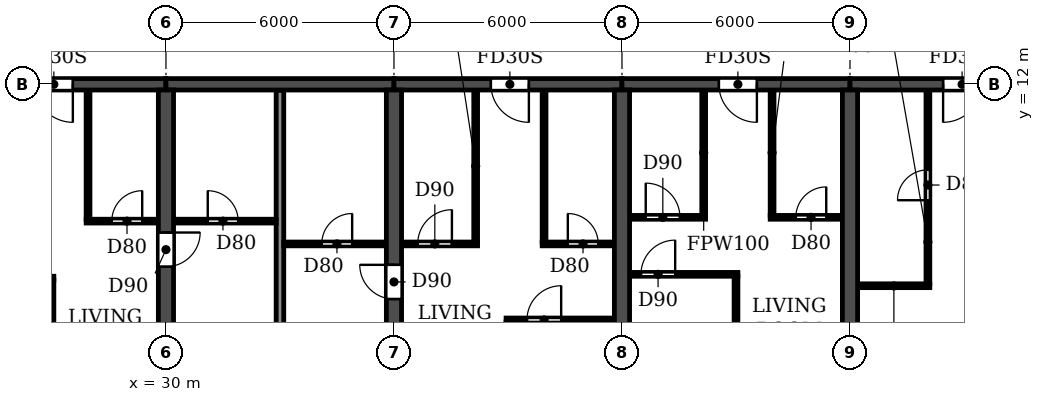
"""IFC4 building model, lengths in metres.
Left out: names, types, materials, properties, quantities, classifications, styles, units other than length and angle.
Written with IfcOpenShell. Run it as: python <this file> out.ifc"""

import sys

from ifc_helpers import new_model, si_unit, direction, frame, frame_2d, origin, place, context, subcontext, project, spatial, rectangle, extrude, element, fill, save


model = new_model("IFC4")
c1 = context("Model", 3, precision=1e-05, world=origin(), true_north=direction((0.0, 1.0)))
c2 = subcontext(c1, "Body", "Model", "MODEL_VIEW")
j1 = project(units=[si_unit("LENGTHUNIT", "METRE"), si_unit("PLANEANGLEUNIT", "RADIAN")], contexts=[c1])
p1 = place(None, origin())
s1 = spatial("IfcSite", under=j1, at=p1, CompositionType="ELEMENT")
p2 = place(p1, origin())
s2 = spatial("IfcBuilding", under=s1, at=p2, CompositionType="ELEMENT")
p3 = place(p2, frame((0.0, 0.0, 63.0)))
s3 = spatial("IfcBuildingStorey", under=s2, at=p3, CompositionType="ELEMENT", Elevation=63.0)
p4 = place(p3, frame((30.0, 0.2, 0.0), z_axis=(0.0, 0.0, 1.0), x_axis=(0.0, 1.0, 0.0)))
e1 = element("IfcWall", 1, at=p4, inside=s3, PredefinedType="SHEAR", context=c2, shape_type="SweptSolid", body=[
    extrude(rectangle(XDim=11.65, YDim=0.4, at=frame_2d((5.825, 0.0))), origin(), (0.0, 0.0, 1.0), 2.95),
])
p5 = place(p4, frame((7.0, 0.0, 0.0)))
e2 = element("IfcOpeningElement", 2, at=p5, cuts=e1, PredefinedType="OPENING", context=c2, shape_type="SweptSolid", body=[
    extrude(rectangle(XDim=0.9, YDim=2.1, at=frame_2d((0.45, 1.05))), frame((0.0, 0.21, 0.0), z_axis=(0.0, -1.0, 0.0), x_axis=(1.0, 0.0, 0.0)), (0.0, 0.0, 1.0), 0.42),
])
p6 = place(p3, frame((36.0, 0.2, 0.0), z_axis=(0.0, 0.0, 1.0), x_axis=(0.0, 1.0, 0.0)))
e3 = element("IfcWall", 3, at=p6, inside=s3, PredefinedType="SHEAR", context=c2, shape_type="SweptSolid", body=[
    extrude(rectangle(XDim=11.65, YDim=0.4, at=frame_2d((5.825, 0.0))), origin(), (0.0, 0.0, 1.0), 2.95),
])
p7 = place(p6, frame((6.15, 0.0, 0.0)))
e4 = element("IfcOpeningElement", 4, at=p7, cuts=e3, PredefinedType="OPENING", context=c2, shape_type="SweptSolid", body=[
    extrude(rectangle(XDim=0.9, YDim=2.1, at=frame_2d((0.45, 1.05))), frame((0.0, 0.21, 0.0), z_axis=(0.0, -1.0, 0.0), x_axis=(1.0, 0.0, 0.0)), (0.0, 0.0, 1.0), 0.42),
])
for number, where, z_axis, x_axis in (
    (5, (42.0, 0.2, 0.0), (0.0, 0.0, 1.0), (0.0, 1.0, 0.0)),
    (6, (48.0, 0.2, 0.0), (0.0, 0.0, 1.0), (0.0, 1.0, 0.0)),
):
    element("IfcWall", number, at=place(p3, frame(where, z_axis=z_axis, x_axis=x_axis)), inside=s3, PredefinedType="SHEAR", context=c2, shape_type="SweptSolid", body=[
        extrude(rectangle(XDim=11.65, YDim=0.4, at=frame_2d((5.825, 0.0))), origin(), (0.0, 0.0, 1.0), 2.95),
    ])
p8 = place(p3, frame((24.0, 12.0, 0.0), z_axis=(0.0, 0.0, 1.0), x_axis=(1.0, 0.0, 0.0)))
e7 = element("IfcWall", 7, at=p8, inside=s3, PredefinedType="SHEAR", context=c2, shape_type="SweptSolid", body=[
    extrude(rectangle(XDim=6.0, YDim=0.3, at=frame_2d((3.0, 0.0))), origin(), (0.0, 0.0, 1.0), 2.35),
])
p9 = place(p8, frame((2.55, 0.0, 0.0)))
e8 = element("IfcOpeningElement", 8, at=p9, cuts=e7, PredefinedType="OPENING", context=c2, shape_type="SweptSolid", body=[
    extrude(rectangle(XDim=1.0, YDim=2.1, at=frame_2d((0.5, 1.05))), frame((0.0, 0.16, 0.0), z_axis=(0.0, -1.0, 0.0), x_axis=(1.0, 0.0, 0.0)), (0.0, 0.0, 1.0), 0.32),
])
p10 = place(p3, frame((30.0, 12.0, 0.0), z_axis=(0.0, 0.0, 1.0), x_axis=(1.0, 0.0, 0.0)))
e9 = element("IfcWall", 9, at=p10, inside=s3, PredefinedType="SHEAR", context=c2, shape_type="SweptSolid", body=[
    extrude(rectangle(XDim=6.0, YDim=0.3, at=frame_2d((3.0, 0.0))), origin(), (0.0, 0.0, 1.0), 2.35),
])
p11 = place(p3, frame((36.0, 12.0, 0.0), z_axis=(0.0, 0.0, 1.0), x_axis=(1.0, 0.0, 0.0)))
e10 = element("IfcWall", 10, at=p11, inside=s3, PredefinedType="SHEAR", context=c2, shape_type="SweptSolid", body=[
    extrude(rectangle(XDim=6.0, YDim=0.3, at=frame_2d((3.0, 0.0))), origin(), (0.0, 0.0, 1.0), 2.35),
])
p12 = place(p11, frame((2.55, 0.0, 0.0)))
e11 = element("IfcOpeningElement", 11, at=p12, cuts=e10, PredefinedType="OPENING", context=c2, shape_type="SweptSolid", body=[
    extrude(rectangle(XDim=1.0, YDim=2.1, at=frame_2d((0.5, 1.05))), frame((0.0, 0.16, 0.0), z_axis=(0.0, -1.0, 0.0), x_axis=(1.0, 0.0, 0.0)), (0.0, 0.0, 1.0), 0.32),
])
p13 = place(p3, frame((42.0, 12.0, 0.0), z_axis=(0.0, 0.0, 1.0), x_axis=(1.0, 0.0, 0.0)))
e12 = element("IfcWall", 12, at=p13, inside=s3, PredefinedType="SHEAR", context=c2, shape_type="SweptSolid", body=[
    extrude(rectangle(XDim=6.0, YDim=0.3, at=frame_2d((3.0, 0.0))), origin(), (0.0, 0.0, 1.0), 2.35),
])
p14 = place(p13, frame((2.55, 0.0, 0.0)))
e13 = element("IfcOpeningElement", 13, at=p14, cuts=e12, PredefinedType="OPENING", context=c2, shape_type="SweptSolid", body=[
    extrude(rectangle(XDim=1.0, YDim=2.1, at=frame_2d((0.5, 1.05))), frame((0.0, 0.16, 0.0), z_axis=(0.0, -1.0, 0.0), x_axis=(1.0, 0.0, 0.0)), (0.0, 0.0, 1.0), 0.32),
])
p15 = place(p3, frame((48.0, 12.0, 0.0), z_axis=(0.0, 0.0, 1.0), x_axis=(1.0, 0.0, 0.0)))
e14 = element("IfcWall", 14, at=p15, inside=s3, PredefinedType="SHEAR", context=c2, shape_type="SweptSolid", body=[
    extrude(rectangle(XDim=6.0, YDim=0.3, at=frame_2d((3.0, 0.0))), origin(), (0.0, 0.0, 1.0), 2.35),
])
p16 = place(p15, frame((2.45, 0.0, 0.0)))
e15 = element("IfcOpeningElement", 15, at=p16, cuts=e14, PredefinedType="OPENING", context=c2, shape_type="SweptSolid", body=[
    extrude(rectangle(XDim=1.0, YDim=2.1, at=frame_2d((0.5, 1.05))), frame((0.0, 0.16, 0.0), z_axis=(0.0, -1.0, 0.0), x_axis=(1.0, 0.0, 0.0)), (0.0, 0.0, 1.0), 0.32),
])
p17 = place(p3, frame((33.0, 0.06, 0.0), z_axis=(0.0, 0.0, 1.0), x_axis=(0.0, 1.0, 0.0)))
e16 = element("IfcWall", 16, at=p17, inside=s3, PredefinedType="PARTITIONING", context=c2, shape_type="SweptSolid", body=[
    extrude(rectangle(XDim=11.78, YDim=0.2, at=frame_2d((5.89, 0.0))), origin(), (0.0, 0.0, 1.0), 2.95),
])
p18 = place(p3, frame((38.95, 5.8, 0.0), z_axis=(0.0, 0.0, 1.0), x_axis=(1.0, 0.0, 0.0)))
e17 = element("IfcWall", 17, at=p18, inside=s3, PredefinedType="PARTITIONING", context=c2, shape_type="SweptSolid", body=[
    extrude(rectangle(XDim=2.84, YDim=0.1, at=frame_2d((1.42, 0.0))), origin(), (0.0, 0.0, 1.0), 2.95),
])
p19 = place(p18, frame((0.55, 0.0, 0.0)))
e18 = element("IfcOpeningElement", 18, at=p19, cuts=e17, PredefinedType="OPENING", context=c2, shape_type="SweptSolid", body=[
    extrude(rectangle(XDim=0.9, YDim=2.1, at=frame_2d((0.45, 1.05))), frame((0.0, 0.06, 0.0), z_axis=(0.0, -1.0, 0.0), x_axis=(1.0, 0.0, 0.0)), (0.0, 0.0, 1.0), 0.12),
])
p20 = place(p3, frame((48.21, 6.7, 0.0), z_axis=(0.0, 0.0, 1.0), x_axis=(1.0, 0.0, 0.0)))
e19 = element("IfcWall", 19, at=p20, inside=s3, PredefinedType="PARTITIONING", context=c2, shape_type="SweptSolid", body=[
    extrude(rectangle(XDim=1.89, YDim=0.1, at=frame_2d((0.945, 0.0))), origin(), (0.0, 0.0, 1.0), 2.95),
])
p21 = place(p3, frame((24.21, 6.9, 0.0), z_axis=(0.0, 0.0, 1.0), x_axis=(1.0, 0.0, 0.0)))
e20 = element("IfcWall", 20, at=p21, inside=s3, PredefinedType="PARTITIONING", context=c2, shape_type="SweptSolid", body=[
    extrude(rectangle(XDim=2.84, YDim=0.1, at=frame_2d((1.42, 0.0))), origin(), (0.0, 0.0, 1.0), 2.95),
])
p22 = place(p21, frame((0.29, 0.0, 0.0)))
e21 = element("IfcOpeningElement", 21, at=p22, cuts=e20, PredefinedType="OPENING", context=c2, shape_type="SweptSolid", body=[
    extrude(rectangle(XDim=0.9, YDim=2.1, at=frame_2d((0.45, 1.05))), frame((0.0, 0.06, 0.0), z_axis=(0.0, -1.0, 0.0), x_axis=(1.0, 0.0, 0.0)), (0.0, 0.0, 1.0), 0.12),
])
p23 = place(p3, frame((42.21, 7.0, 0.0), z_axis=(0.0, 0.0, 1.0), x_axis=(1.0, 0.0, 0.0)))
e22 = element("IfcWall", 22, at=p23, inside=s3, PredefinedType="PARTITIONING", context=c2, shape_type="SweptSolid", body=[
    extrude(rectangle(XDim=2.84, YDim=0.1, at=frame_2d((1.42, 0.0))), origin(), (0.0, 0.0, 1.0), 2.95),
])
p24 = place(p23, frame((0.29, 0.0, 0.0)))
e23 = element("IfcOpeningElement", 23, at=p24, cuts=e22, PredefinedType="OPENING", context=c2, shape_type="SweptSolid", body=[
    extrude(rectangle(XDim=0.9, YDim=2.1, at=frame_2d((0.45, 1.05))), frame((0.0, 0.06, 0.0), z_axis=(0.0, -1.0, 0.0), x_axis=(1.0, 0.0, 0.0)), (0.0, 0.0, 1.0), 0.12),
])
p25 = place(p3, frame((33.1, 7.8, 0.0), z_axis=(0.0, 0.0, 1.0), x_axis=(1.0, 0.0, 0.0)))
e24 = element("IfcWall", 24, at=p25, inside=s3, PredefinedType="PARTITIONING", context=c2, shape_type="SweptSolid", body=[
    extrude(rectangle(XDim=2.69, YDim=0.1, at=frame_2d((1.345, 0.0))), origin(), (0.0, 0.0, 1.0), 2.95),
])
p26 = place(p25, frame((1.0, 0.0, 0.0)))
e25 = element("IfcOpeningElement", 25, at=p26, cuts=e24, PredefinedType="OPENING", context=c2, shape_type="SweptSolid", body=[
    extrude(rectangle(XDim=0.8, YDim=2.1, at=frame_2d((0.4, 1.05))), frame((0.0, 0.06, 0.0), z_axis=(0.0, -1.0, 0.0), x_axis=(1.0, 0.0, 0.0)), (0.0, 0.0, 1.0), 0.12),
])
p27 = place(p3, frame((36.21, 7.8, 0.0), z_axis=(0.0, 0.0, 1.0), x_axis=(1.0, 0.0, 0.0)))
e26 = element("IfcWall", 26, at=p27, inside=s3, PredefinedType="PARTITIONING", context=c2, shape_type="SweptSolid", body=[
    extrude(rectangle(XDim=1.99, YDim=0.1, at=frame_2d((0.995, 0.0))), origin(), (0.0, 0.0, 1.0), 2.95),
])
p28 = place(p27, frame((0.415, 0.0, 0.0)))
e27 = element("IfcOpeningElement", 27, at=p28, cuts=e26, PredefinedType="OPENING", context=c2, shape_type="SweptSolid", body=[
    extrude(rectangle(XDim=0.9, YDim=2.1, at=frame_2d((0.45, 1.05))), frame((0.0, 0.06, 0.0), z_axis=(0.0, -1.0, 0.0), x_axis=(1.0, 0.0, 0.0)), (0.0, 0.0, 1.0), 0.12),
])
p29 = place(p3, frame((39.9, 7.8, 0.0), z_axis=(0.0, 0.0, 1.0), x_axis=(1.0, 0.0, 0.0)))
e28 = element("IfcWall", 28, at=p29, inside=s3, PredefinedType="PARTITIONING", context=c2, shape_type="SweptSolid", body=[
    extrude(rectangle(XDim=1.89, YDim=0.1, at=frame_2d((0.945, 0.0))), origin(), (0.0, 0.0, 1.0), 2.95),
])
p30 = place(p29, frame((0.675, 0.0, 0.0)))
e29 = element("IfcOpeningElement", 29, at=p30, cuts=e28, PredefinedType="OPENING", context=c2, shape_type="SweptSolid", body=[
    extrude(rectangle(XDim=0.8, YDim=2.1, at=frame_2d((0.4, 1.05))), frame((0.0, 0.06, 0.0), z_axis=(0.0, -1.0, 0.0), x_axis=(1.0, 0.0, 0.0)), (0.0, 0.0, 1.0), 0.12),
])
p31 = place(p3, frame((27.9, 8.4, 0.0), z_axis=(0.0, 0.0, 1.0), x_axis=(1.0, 0.0, 0.0)))
e30 = element("IfcWall", 30, at=p31, inside=s3, PredefinedType="PARTITIONING", context=c2, shape_type="SweptSolid", body=[
    extrude(rectangle(XDim=1.89, YDim=0.1, at=frame_2d((0.945, 0.0))), origin(), (0.0, 0.0, 1.0), 2.95),
])
p32 = place(p31, frame((0.675, 0.0, 0.0)))
e31 = element("IfcOpeningElement", 31, at=p32, cuts=e30, PredefinedType="OPENING", context=c2, shape_type="SweptSolid", body=[
    extrude(rectangle(XDim=0.8, YDim=2.1, at=frame_2d((0.4, 1.05))), frame((0.0, 0.06, 0.0), z_axis=(0.0, -1.0, 0.0), x_axis=(1.0, 0.0, 0.0)), (0.0, 0.0, 1.0), 0.12),
])
p33 = place(p3, frame((30.21, 8.4, 0.0), z_axis=(0.0, 0.0, 1.0), x_axis=(1.0, 0.0, 0.0)))
e32 = element("IfcWall", 32, at=p33, inside=s3, PredefinedType="PARTITIONING", context=c2, shape_type="SweptSolid", body=[
    extrude(rectangle(XDim=2.69, YDim=0.1, at=frame_2d((1.345, 0.0))), origin(), (0.0, 0.0, 1.0), 2.95),
])
p34 = place(p33, frame((0.89, 0.0, 0.0)))
e33 = element("IfcOpeningElement", 33, at=p34, cuts=e32, PredefinedType="OPENING", context=c2, shape_type="SweptSolid", body=[
    extrude(rectangle(XDim=0.8, YDim=2.1, at=frame_2d((0.4, 1.05))), frame((0.0, 0.06, 0.0), z_axis=(0.0, -1.0, 0.0), x_axis=(1.0, 0.0, 0.0)), (0.0, 0.0, 1.0), 0.12),
])
p35 = place(p3, frame((42.21, 8.5, 0.0), z_axis=(0.0, 0.0, 1.0), x_axis=(1.0, 0.0, 0.0)))
e34 = element("IfcWall", 34, at=p35, inside=s3, PredefinedType="PARTITIONING", context=c2, shape_type="SweptSolid", body=[
    extrude(rectangle(XDim=1.99, YDim=0.1, at=frame_2d((0.995, 0.0))), origin(), (0.0, 0.0, 1.0), 2.95),
])
p36 = place(p35, frame((0.415, 0.0, 0.0)))
e35 = element("IfcOpeningElement", 35, at=p36, cuts=e34, PredefinedType="OPENING", context=c2, shape_type="SweptSolid", body=[
    extrude(rectangle(XDim=0.9, YDim=2.1, at=frame_2d((0.45, 1.05))), frame((0.0, 0.06, 0.0), z_axis=(0.0, -1.0, 0.0), x_axis=(1.0, 0.0, 0.0)), (0.0, 0.0, 1.0), 0.12),
])
p37 = place(p3, frame((45.9, 8.5, 0.0), z_axis=(0.0, 0.0, 1.0), x_axis=(1.0, 0.0, 0.0)))
e36 = element("IfcWall", 36, at=p37, inside=s3, PredefinedType="PARTITIONING", context=c2, shape_type="SweptSolid", body=[
    extrude(rectangle(XDim=1.89, YDim=0.1, at=frame_2d((0.945, 0.0))), origin(), (0.0, 0.0, 1.0), 2.95),
])
p38 = place(p37, frame((0.675, 0.0, 0.0)))
e37 = element("IfcOpeningElement", 37, at=p38, cuts=e36, PredefinedType="OPENING", context=c2, shape_type="SweptSolid", body=[
    extrude(rectangle(XDim=0.8, YDim=2.1, at=frame_2d((0.4, 1.05))), frame((0.0, 0.06, 0.0), z_axis=(0.0, -1.0, 0.0), x_axis=(1.0, 0.0, 0.0)), (0.0, 0.0, 1.0), 0.12),
])
p39 = place(p3, frame((27.0, 0.06, 0.0), z_axis=(0.0, 0.0, 1.0), x_axis=(0.0, 1.0, 0.0)))
e38 = element("IfcWall", 38, at=p39, inside=s3, PredefinedType="PARTITIONING", context=c2, shape_type="SweptSolid", body=[
    extrude(rectangle(XDim=6.79, YDim=0.1, at=frame_2d((3.395, 0.0))), origin(), (0.0, 0.0, 1.0), 2.95),
])
p40 = place(p3, frame((27.95, 8.45, 0.0), z_axis=(0.0, 0.0, 1.0), x_axis=(0.0, 1.0, 0.0)))
e39 = element("IfcWall", 39, at=p40, inside=s3, PredefinedType="PARTITIONING", context=c2, shape_type="SweptSolid", body=[
    extrude(rectangle(XDim=3.39, YDim=0.1, at=frame_2d((1.695, 0.0))), origin(), (0.0, 0.0, 1.0), 2.95),
])
for number, where, z_axis, x_axis in (
    (40, (38.15, 7.85, 0.0), (0.0, 0.0, 1.0), (0.0, 1.0, 0.0)),
    (41, (39.95, 7.85, 0.0), (0.0, 0.0, 1.0), (0.0, 1.0, 0.0)),
):
    element("IfcWall", number, at=place(p3, frame(where, z_axis=z_axis, x_axis=x_axis)), inside=s3, PredefinedType="PARTITIONING", context=c2, shape_type="SweptSolid", body=[
        extrude(rectangle(XDim=3.99, YDim=0.1, at=frame_2d((1.995, 0.0))), origin(), (0.0, 0.0, 1.0), 2.95),
    ])
p41 = place(p3, frame((44.15, 8.55, 0.0), z_axis=(0.0, 0.0, 1.0), x_axis=(0.0, 1.0, 0.0)))
e42 = element("IfcWall", 42, at=p41, inside=s3, PredefinedType="PARTITIONING", context=c2, shape_type="SweptSolid", body=[
    extrude(rectangle(XDim=3.29, YDim=0.1, at=frame_2d((1.645, 0.0))), origin(), (0.0, 0.0, 1.0), 2.95),
])
p42 = place(p3, frame((45.0, 0.06, 0.0), z_axis=(0.0, 0.0, 1.0), x_axis=(0.0, 1.0, 0.0)))
e43 = element("IfcWall", 43, at=p42, inside=s3, PredefinedType="PARTITIONING", context=c2, shape_type="SweptSolid", body=[
    extrude(rectangle(XDim=6.89, YDim=0.1, at=frame_2d((3.445, 0.0))), origin(), (0.0, 0.0, 1.0), 2.95),
])
p43 = place(p3, frame((45.95, 8.55, 0.0), z_axis=(0.0, 0.0, 1.0), x_axis=(0.0, 1.0, 0.0)))
e44 = element("IfcWall", 44, at=p43, inside=s3, PredefinedType="PARTITIONING", context=c2, shape_type="SweptSolid", body=[
    extrude(rectangle(XDim=3.29, YDim=0.1, at=frame_2d((1.645, 0.0))), origin(), (0.0, 0.0, 1.0), 2.95),
])
p44 = place(p3, frame((50.05, 6.75, 0.0), z_axis=(0.0, 0.0, 1.0), x_axis=(0.0, 1.0, 0.0)))
e45 = element("IfcWall", 45, at=p44, inside=s3, PredefinedType="PARTITIONING", context=c2, shape_type="SweptSolid", body=[
    extrude(rectangle(XDim=5.09, YDim=0.1, at=frame_2d((2.545, 0.0))), origin(), (0.0, 0.0, 1.0), 2.95),
])
p45 = place(p44, frame((2.2, 0.0, 0.0)))
e46 = element("IfcOpeningElement", 46, at=p45, cuts=e45, PredefinedType="OPENING", context=c2, shape_type="SweptSolid", body=[
    extrude(rectangle(XDim=0.8, YDim=2.1, at=frame_2d((0.4, 1.05))), frame((0.0, 0.06, 0.0), z_axis=(0.0, -1.0, 0.0), x_axis=(1.0, 0.0, 0.0)), (0.0, 0.0, 1.0), 0.12),
])
p46 = place(p34, origin())
e47 = element("IfcDoor", 47, at=p46, inside=s3, OperationType="SINGLE_SWING_LEFT", PredefinedType="DOOR", context=c2, shape_type="SweptSolid", body=[
    extrude(rectangle(XDim=0.8, YDim=2.1, at=frame_2d((0.4, 1.05))), frame((0.0, 0.025, 0.0), z_axis=(0.0, -1.0, 0.0), x_axis=(1.0, 0.0, 0.0)), (0.0, 0.0, 1.0), 0.05),
])
fill(e33, e47)
p47 = place(p9, frame((1.0, 0.0, 0.0), z_axis=(0.0, 0.0, 1.0), x_axis=(-1.0, 0.0, 0.0)))
e48 = element("IfcDoor", 48, at=p47, inside=s3, OperationType="SINGLE_SWING_LEFT", PredefinedType="DOOR", context=c2, shape_type="SweptSolid", body=[
    extrude(rectangle(XDim=1.0, YDim=2.1, at=frame_2d((0.5, 1.05))), frame((0.0, 0.025, 0.0), z_axis=(0.0, -1.0, 0.0), x_axis=(1.0, 0.0, 0.0)), (0.0, 0.0, 1.0), 0.05),
])
fill(e8, e48)
p48 = place(p32, origin())
e49 = element("IfcDoor", 49, at=p48, inside=s3, OperationType="SINGLE_SWING_RIGHT", PredefinedType="DOOR", context=c2, shape_type="SweptSolid", body=[
    extrude(rectangle(XDim=0.8, YDim=2.1, at=frame_2d((0.4, 1.05))), frame((0.0, 0.025, 0.0), z_axis=(0.0, -1.0, 0.0), x_axis=(1.0, 0.0, 0.0)), (0.0, 0.0, 1.0), 0.05),
])
fill(e31, e49)
p49 = place(p5, frame((0.9, 0.0, 0.0), z_axis=(0.0, 0.0, 1.0), x_axis=(-1.0, 0.0, 0.0)))
e50 = element("IfcDoor", 50, at=p49, inside=s3, OperationType="SINGLE_SWING_LEFT", PredefinedType="DOOR", context=c2, shape_type="SweptSolid", body=[
    extrude(rectangle(XDim=0.9, YDim=2.1, at=frame_2d((0.45, 1.05))), frame((0.0, 0.025, 0.0), z_axis=(0.0, -1.0, 0.0), x_axis=(1.0, 0.0, 0.0)), (0.0, 0.0, 1.0), 0.05),
])
fill(e2, e50)
p50 = place(p26, origin())
e51 = element("IfcDoor", 51, at=p50, inside=s3, OperationType="SINGLE_SWING_RIGHT", PredefinedType="DOOR", context=c2, shape_type="SweptSolid", body=[
    extrude(rectangle(XDim=0.8, YDim=2.1, at=frame_2d((0.4, 1.05))), frame((0.0, 0.025, 0.0), z_axis=(0.0, -1.0, 0.0), x_axis=(1.0, 0.0, 0.0)), (0.0, 0.0, 1.0), 0.05),
])
fill(e25, e51)
p51 = place(p7, origin())
e52 = element("IfcDoor", 52, at=p51, inside=s3, OperationType="SINGLE_SWING_RIGHT", PredefinedType="DOOR", context=c2, shape_type="SweptSolid", body=[
    extrude(rectangle(XDim=0.9, YDim=2.1, at=frame_2d((0.45, 1.05))), frame((0.0, 0.025, 0.0), z_axis=(0.0, -1.0, 0.0), x_axis=(1.0, 0.0, 0.0)), (0.0, 0.0, 1.0), 0.05),
])
fill(e4, e52)
p52 = place(p28, origin())
e53 = element("IfcDoor", 53, at=p52, inside=s3, OperationType="SINGLE_SWING_RIGHT", PredefinedType="DOOR", context=c2, shape_type="SweptSolid", body=[
    extrude(rectangle(XDim=0.9, YDim=2.1, at=frame_2d((0.45, 1.05))), frame((0.0, 0.025, 0.0), z_axis=(0.0, -1.0, 0.0), x_axis=(1.0, 0.0, 0.0)), (0.0, 0.0, 1.0), 0.05),
])
fill(e27, e53)
p53 = place(p12, frame((1.0, 0.0, 0.0), z_axis=(0.0, 0.0, 1.0), x_axis=(-1.0, 0.0, 0.0)))
e54 = element("IfcDoor", 54, at=p53, inside=s3, OperationType="SINGLE_SWING_LEFT", PredefinedType="DOOR", context=c2, shape_type="SweptSolid", body=[
    extrude(rectangle(XDim=1.0, YDim=2.1, at=frame_2d((0.5, 1.05))), frame((0.0, 0.025, 0.0), z_axis=(0.0, -1.0, 0.0), x_axis=(1.0, 0.0, 0.0)), (0.0, 0.0, 1.0), 0.05),
])
fill(e11, e54)
p54 = place(p19, origin())
e55 = element("IfcDoor", 55, at=p54, inside=s3, OperationType="SINGLE_SWING_RIGHT", PredefinedType="DOOR", context=c2, shape_type="SweptSolid", body=[
    extrude(rectangle(XDim=0.9, YDim=2.1, at=frame_2d((0.45, 1.05))), frame((0.0, 0.025, 0.0), z_axis=(0.0, -1.0, 0.0), x_axis=(1.0, 0.0, 0.0)), (0.0, 0.0, 1.0), 0.05),
])
fill(e18, e55)
p55 = place(p30, origin())
e56 = element("IfcDoor", 56, at=p55, inside=s3, OperationType="SINGLE_SWING_LEFT", PredefinedType="DOOR", context=c2, shape_type="SweptSolid", body=[
    extrude(rectangle(XDim=0.8, YDim=2.1, at=frame_2d((0.4, 1.05))), frame((0.0, 0.025, 0.0), z_axis=(0.0, -1.0, 0.0), x_axis=(1.0, 0.0, 0.0)), (0.0, 0.0, 1.0), 0.05),
])
fill(e29, e56)
p56 = place(p24, origin())
e57 = element("IfcDoor", 57, at=p56, inside=s3, OperationType="SINGLE_SWING_RIGHT", PredefinedType="DOOR", context=c2, shape_type="SweptSolid", body=[
    extrude(rectangle(XDim=0.9, YDim=2.1, at=frame_2d((0.45, 1.05))), frame((0.0, 0.025, 0.0), z_axis=(0.0, -1.0, 0.0), x_axis=(1.0, 0.0, 0.0)), (0.0, 0.0, 1.0), 0.05),
])
fill(e23, e57)
p57 = place(p36, origin())
e58 = element("IfcDoor", 58, at=p57, inside=s3, OperationType="SINGLE_SWING_LEFT", PredefinedType="DOOR", context=c2, shape_type="SweptSolid", body=[
    extrude(rectangle(XDim=0.9, YDim=2.1, at=frame_2d((0.45, 1.05))), frame((0.0, 0.025, 0.0), z_axis=(0.0, -1.0, 0.0), x_axis=(1.0, 0.0, 0.0)), (0.0, 0.0, 1.0), 0.05),
])
fill(e35, e58)
p58 = place(p14, frame((1.0, 0.0, 0.0), z_axis=(0.0, 0.0, 1.0), x_axis=(-1.0, 0.0, 0.0)))
e59 = element("IfcDoor", 59, at=p58, inside=s3, OperationType="SINGLE_SWING_LEFT", PredefinedType="DOOR", context=c2, shape_type="SweptSolid", body=[
    extrude(rectangle(XDim=1.0, YDim=2.1, at=frame_2d((0.5, 1.05))), frame((0.0, 0.025, 0.0), z_axis=(0.0, -1.0, 0.0), x_axis=(1.0, 0.0, 0.0)), (0.0, 0.0, 1.0), 0.05),
])
fill(e13, e59)
p59 = place(p38, origin())
e60 = element("IfcDoor", 60, at=p59, inside=s3, OperationType="SINGLE_SWING_RIGHT", PredefinedType="DOOR", context=c2, shape_type="SweptSolid", body=[
    extrude(rectangle(XDim=0.8, YDim=2.1, at=frame_2d((0.4, 1.05))), frame((0.0, 0.025, 0.0), z_axis=(0.0, -1.0, 0.0), x_axis=(1.0, 0.0, 0.0)), (0.0, 0.0, 1.0), 0.05),
])
fill(e37, e60)
p60 = place(p45, origin())
e61 = element("IfcDoor", 61, at=p60, inside=s3, OperationType="SINGLE_SWING_LEFT", PredefinedType="DOOR", context=c2, shape_type="SweptSolid", body=[
    extrude(rectangle(XDim=0.8, YDim=2.1, at=frame_2d((0.4, 1.05))), frame((0.0, 0.025, 0.0), z_axis=(0.0, -1.0, 0.0), x_axis=(1.0, 0.0, 0.0)), (0.0, 0.0, 1.0), 0.05),
])
fill(e46, e61)
p61 = place(p16, frame((1.0, 0.0, 0.0), z_axis=(0.0, 0.0, 1.0), x_axis=(-1.0, 0.0, 0.0)))
e62 = element("IfcDoor", 62, at=p61, inside=s3, OperationType="SINGLE_SWING_RIGHT", PredefinedType="DOOR", context=c2, shape_type="SweptSolid", body=[
    extrude(rectangle(XDim=1.0, YDim=2.1, at=frame_2d((0.5, 1.05))), frame((0.0, 0.025, 0.0), z_axis=(0.0, -1.0, 0.0), x_axis=(1.0, 0.0, 0.0)), (0.0, 0.0, 1.0), 0.05),
])
fill(e15, e62)
save(model, sys.argv[1])
